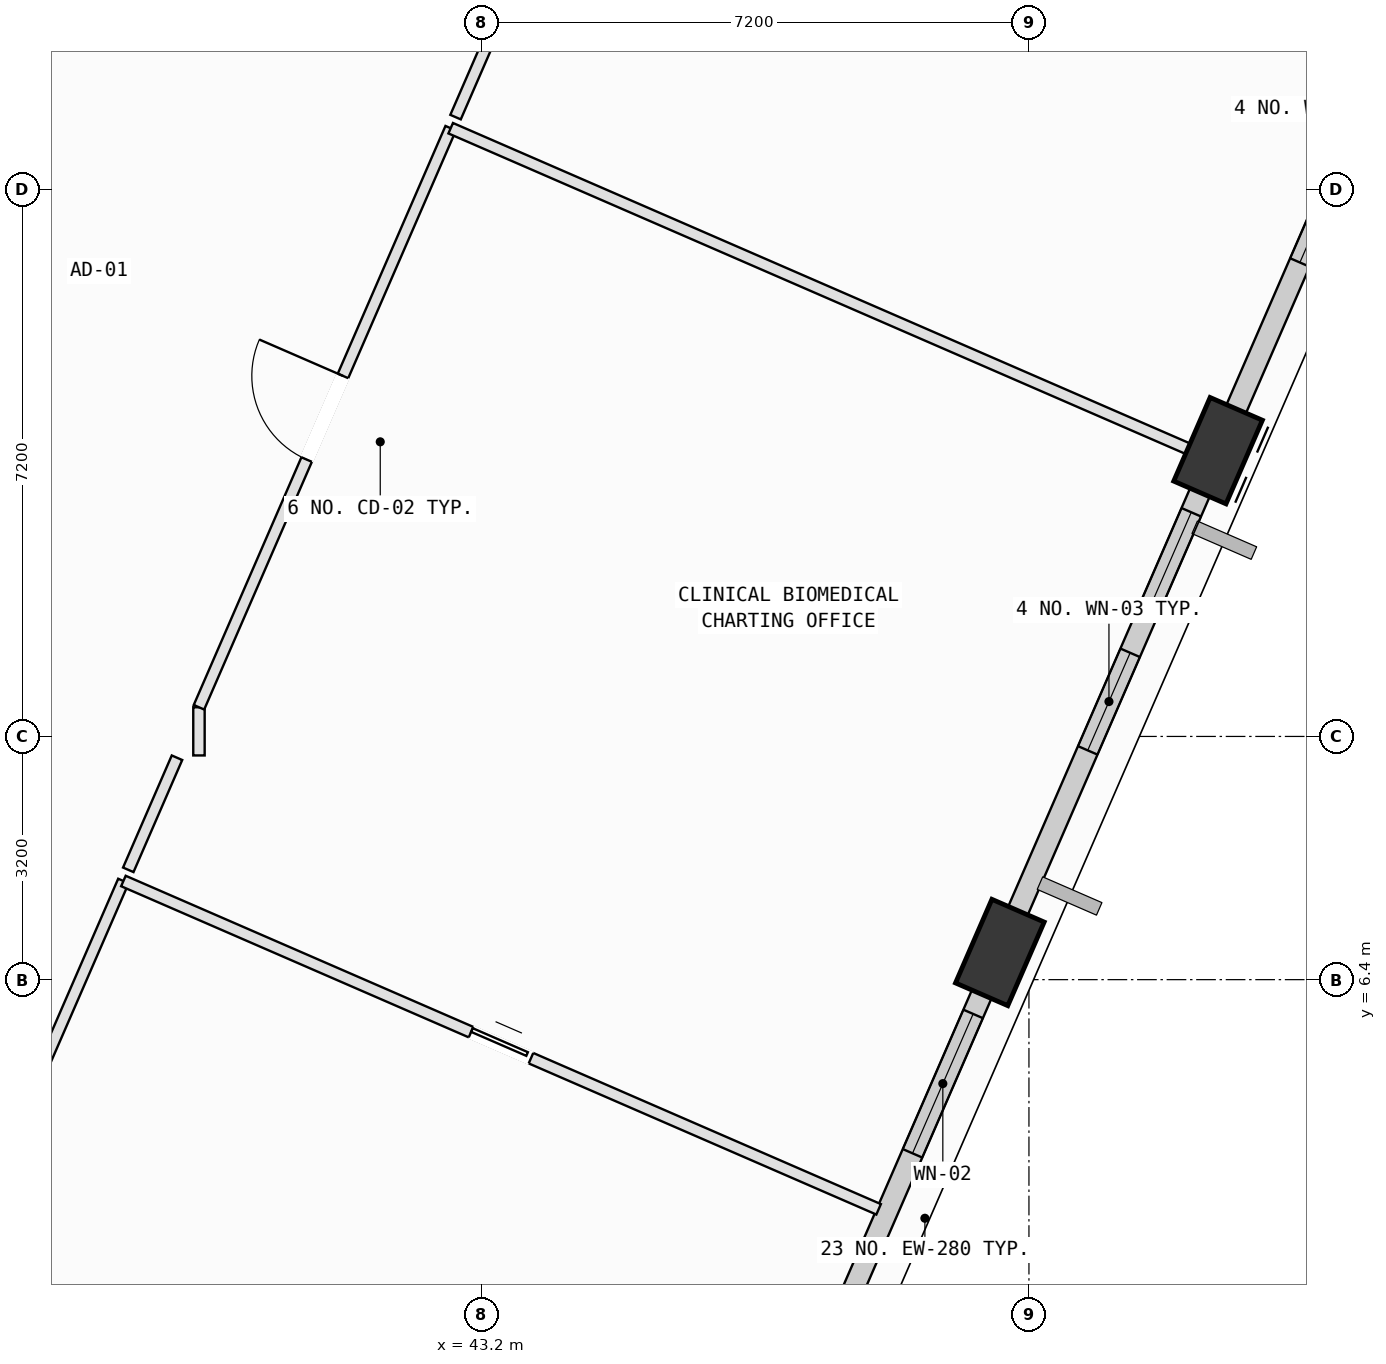
"""IFC4 building model, lengths in metres.
Left out: names, types, materials, properties, quantities, classifications, styles, units other than length and angle.
Written with IfcOpenShell. Run it as: python <this file> out.ifc"""

import sys

from ifc_helpers import new_model, si_unit, direction, frame, frame_2d, origin, origin_2d, place, context, subcontext, project, spatial, rectangle, extrude, element, fill, save


model = new_model("IFC4")
c1 = context("Model", 3, precision=1e-05, world=origin(), true_north=direction((0.0, 1.0)))
c2 = subcontext(c1, "Body", "Model", "MODEL_VIEW")
j1 = project(units=[si_unit("LENGTHUNIT", "METRE"), si_unit("PLANEANGLEUNIT", "RADIAN")], contexts=[c1])
p1 = place(None, origin())
s1 = spatial("IfcSite", under=j1, at=p1, CompositionType="ELEMENT")
p2 = place(p1, origin())
s2 = spatial("IfcBuilding", under=s1, at=p2, CompositionType="ELEMENT")
p3 = place(p2, frame((0.0, 0.0, 308.6)))
s3 = spatial("IfcBuildingStorey", under=s2, at=p3, CompositionType="ELEMENT", Elevation=308.6)
for number, where, z_axis, x_axis in (
    (1, (50.017, 6.757, 0.002), (0.0, 0.0, 1.0), (0.399, 0.917, 0.0)),
    (2, (52.888, 13.36, 0.002), (0.0, 0.0, 1.0), (0.399, 0.917, 0.0)),
):
    element("IfcColumn", number, at=place(p3, frame(where, z_axis=z_axis, x_axis=x_axis)), inside=s3, PredefinedType="COLUMN", context=c2, shape_type="SweptSolid", body=[
        extrude(rectangle(XDim=1.2, YDim=0.75, at=origin_2d()), origin(), (0.0, 0.0, 1.0), 3.996),
    ])
p4 = place(p3, frame((49.859, 6.393, 0.0), z_axis=(0.0, 0.0, 1.0), x_axis=(-0.398758169539, -0.917056117272, 0.0)))
e3 = element("IfcWall", 3, at=p4, inside=s3, PredefinedType="SOLIDWALL", context=c2, shape_type="SweptSolid", body=[
    extrude(rectangle(XDim=6.405, YDim=0.28, at=frame_2d((3.202, 0.0))), origin(), (0.0, 0.0, 1.0), 3.265),
])
p5 = place(p4, frame((0.484, 0.0, 0.75)))
e4 = element("IfcOpeningElement", 4, at=p5, cuts=e3, PredefinedType="OPENING", context=c2, shape_type="SweptSolid", body=[
    extrude(rectangle(XDim=2.0, YDim=1.95, at=frame_2d((1.0, 0.975))), frame((0.0, 0.15, 0.0), z_axis=(0.0, -1.0, 0.0), x_axis=(1.0, 0.0, 0.0)), (0.0, 0.0, 1.0), 0.3),
])
p6 = place(p3, frame((52.729, 12.996, 0.0), z_axis=(0.0, 0.0, 1.0), x_axis=(-0.398744230651, -0.917062178112, 0.0)))
e5 = element("IfcWall", 5, at=p6, inside=s3, PredefinedType="SOLIDWALL", context=c2, shape_type="SweptSolid", body=[
    extrude(rectangle(XDim=6.405, YDim=0.28, at=frame_2d((3.203, 0.0))), origin(), (0.0, 0.0, 1.0), 3.265),
])
p7 = place(p6, frame((2.502, 0.0, 0.75)))
e6 = element("IfcOpeningElement", 6, at=p7, cuts=e5, PredefinedType="OPENING", context=c2, shape_type="SweptSolid", body=[
    extrude(rectangle(XDim=1.4, YDim=1.85, at=frame_2d((0.7, 0.925))), frame((0.0, 0.15, 0.0), z_axis=(0.0, -1.0, 0.0), x_axis=(1.0, 0.0, 0.0)), (0.0, 0.0, 1.0), 0.3),
])
p8 = place(p6, frame((0.486, 0.0, 0.75)))
e7 = element("IfcOpeningElement", 7, at=p8, cuts=e5, PredefinedType="OPENING", context=c2, shape_type="SweptSolid", body=[
    extrude(rectangle(XDim=1.4, YDim=1.85, at=frame_2d((0.7, 0.925))), frame((0.0, 0.15, 0.0), z_axis=(0.0, -1.0, 0.0), x_axis=(1.0, 0.0, 0.0)), (0.0, 0.0, 1.0), 0.3),
])
p9 = place(p3, frame((55.601, 19.598, 0.0), z_axis=(0.0, 0.0, 1.0), x_axis=(-0.398744230651, -0.917062178112, 0.0)))
e8 = element("IfcWall", 8, at=p9, inside=s3, PredefinedType="SOLIDWALL", context=c2, shape_type="SweptSolid", body=[
    extrude(rectangle(XDim=6.405, YDim=0.28, at=frame_2d((3.203, 0.0))), origin(), (0.0, 0.0, 1.0), 3.265),
])
p10 = place(p9, frame((2.302, 0.0, 0.75)))
e9 = element("IfcOpeningElement", 9, at=p10, cuts=e8, PredefinedType="OPENING", context=c2, shape_type="SweptSolid", body=[
    extrude(rectangle(XDim=1.8, YDim=2.05, at=frame_2d((0.9, 1.025))), frame((0.0, 0.15, 0.0), z_axis=(0.0, -1.0, 0.0), x_axis=(1.0, 0.0, 0.0)), (0.0, 0.0, 1.0), 0.3),
])
p11 = place(p3, frame((33.286, -4.26, 0.0), z_axis=(0.0, 0.0, 1.0), x_axis=(0.398794571869, 0.9170402878, 0.0)))
e10 = element("IfcWall", 10, at=p11, inside=s3, PredefinedType="PARTITIONING", context=c2, shape_type="SweptSolid", body=[
    extrude(rectangle(XDim=13.04, YDim=0.15, at=frame_2d((6.52, 0.0))), origin(), (0.0, 0.0, 1.0), 2.765),
])
p12 = place(p3, frame((38.486, 7.698, 0.0), z_axis=(0.0, 0.0, 1.0), x_axis=(0.917068265028, -0.398730231207, 0.0)))
e11 = element("IfcWall", 11, at=p12, inside=s3, PredefinedType="PARTITIONING", context=c2, shape_type="SweptSolid", body=[
    extrude(rectangle(XDim=10.834, YDim=0.15, at=frame_2d((5.417, 0.0))), origin(), (0.0, 0.0, 1.0), 2.765),
])
p13 = place(p12, frame((4.987, 0.0, 0.0)))
e12 = element("IfcOpeningElement", 12, at=p13, cuts=e11, PredefinedType="OPENING", context=c2, shape_type="SweptSolid", body=[
    extrude(rectangle(XDim=0.86, YDim=2.06, at=frame_2d((0.43, 1.03))), frame((0.0, 0.085, 0.0), z_axis=(0.0, -1.0, 0.0), x_axis=(1.0, 0.0, 0.0)), (0.0, 0.0, 1.0), 0.17),
])
p14 = place(p3, frame((39.48, 9.35, 0.0), z_axis=(0.0, 0.0, 1.0), x_axis=(0.0, 1.0, 0.0)))
e13 = element("IfcWall", 13, at=p14, inside=s3, PredefinedType="PARTITIONING", context=c2, shape_type="SweptSolid", body=[
    extrude(rectangle(XDim=0.634, YDim=0.15, at=frame_2d((0.317, 0.0))), origin(), (0.0, 0.0, 1.0), 3.78),
])
p15 = place(p3, frame((39.48, 9.984, 0.0), z_axis=(0.0, 0.0, 1.0), x_axis=(0.398659488131, 0.917099020021, 0.0)))
e14 = element("IfcWall", 14, at=p15, inside=s3, PredefinedType="PARTITIONING", context=c2, shape_type="SweptSolid", body=[
    extrude(rectangle(XDim=8.308, YDim=0.15, at=frame_2d((4.154, 0.0))), origin(), (0.0, 0.0, 1.0), 3.78),
])
p16 = place(p15, frame((3.554, 0.0, 0.0)))
e15 = element("IfcOpeningElement", 15, at=p16, cuts=e14, PredefinedType="OPENING", context=c2, shape_type="SweptSolid", body=[
    extrude(rectangle(XDim=1.2, YDim=2.15, at=frame_2d((0.6, 1.075))), frame((0.0, 0.085, 0.0), z_axis=(0.0, -1.0, 0.0), x_axis=(1.0, 0.0, 0.0)), (0.0, 0.0, 1.0), 0.17),
])
p17 = place(p3, frame((42.792, 17.603, 0.0), z_axis=(0.0, 0.0, 1.0), x_axis=(0.917063112739, -0.398742081117, 0.0)))
e16 = element("IfcWall", 16, at=p17, inside=s3, PredefinedType="PARTITIONING", context=c2, shape_type="SweptSolid", body=[
    extrude(rectangle(XDim=11.18, YDim=0.15, at=frame_2d((5.59, 0.0))), origin(), (0.0, 0.0, 1.0), 3.78),
])
p18 = place(p3, frame((50.386, 7.03, 0.0), z_axis=(0.0, 0.0, 1.0), x_axis=(-0.398658726612, -0.91709935105, 0.0)))
e17 = element("IfcWall", 17, at=p18, inside=s3, PredefinedType="PARTITIONING", context=c2, shape_type="SweptSolid", body=[
    extrude(rectangle(XDim=0.795, YDim=0.15, at=frame_2d((0.397, 0.0))), origin(), (0.0, 0.0, 1.0), 3.265),
])
p19 = place(p3, frame((38.55, 7.845, 0.0), z_axis=(0.0, 0.0, 1.0), x_axis=(0.398476313607, 0.917178623548, 0.0)))
e18 = element("IfcWall", 18, at=p19, inside=s3, PredefinedType="PARTITIONING", context=c2, shape_type="SweptSolid", body=[
    extrude(rectangle(XDim=1.608, YDim=0.15, at=frame_2d((0.804, 0.0))), origin(), (0.0, 0.0, 1.0), 3.78),
])
p20 = place(p3, frame((42.856, 17.749, 0.0), z_axis=(0.0, 0.0, 1.0), x_axis=(0.398751440491, 0.917059043195, 0.0)))
e19 = element("IfcWall", 19, at=p20, inside=s3, PredefinedType="PARTITIONING", context=c2, shape_type="SweptSolid", body=[
    extrude(rectangle(XDim=13.041, YDim=0.15, at=frame_2d((6.52, 0.0))), origin(), (0.0, 0.0, 1.0), 3.78),
])
p21 = place(p20, frame((5.92, 0.0, 0.0)))
e20 = element("IfcOpeningElement", 20, at=p21, cuts=e19, PredefinedType="OPENING", context=c2, shape_type="SweptSolid", body=[
    extrude(rectangle(XDim=1.2, YDim=2.15, at=frame_2d((0.6, 1.075))), frame((0.0, 0.085, 0.0), z_axis=(0.0, -1.0, 0.0), x_axis=(1.0, 0.0, 0.0)), (0.0, 0.0, 1.0), 0.17),
])
p22 = place(p5, origin())
e21 = element("IfcWindow", 21, at=p22, inside=s3, PartitioningType="SINGLE_PANEL", PredefinedType="WINDOW", context=c2, shape_type="SweptSolid", body=[
    extrude(rectangle(XDim=2.0, YDim=1.95, at=frame_2d((1.0, 0.975))), frame((0.0, 0.03, 0.0), z_axis=(0.0, -1.0, 0.0), x_axis=(1.0, 0.0, 0.0)), (0.0, 0.0, 1.0), 0.06),
])
fill(e4, e21)
p23 = place(p7, origin())
e22 = element("IfcWindow", 22, at=p23, inside=s3, PartitioningType="SINGLE_PANEL", PredefinedType="WINDOW", context=c2, shape_type="SweptSolid", body=[
    extrude(rectangle(XDim=1.4, YDim=1.85, at=frame_2d((0.7, 0.925))), frame((0.0, 0.03, 0.0), z_axis=(0.0, -1.0, 0.0), x_axis=(1.0, 0.0, 0.0)), (0.0, 0.0, 1.0), 0.06),
])
fill(e6, e22)
p24 = place(p8, origin())
e23 = element("IfcWindow", 23, at=p24, inside=s3, PartitioningType="SINGLE_PANEL", PredefinedType="WINDOW", context=c2, shape_type="SweptSolid", body=[
    extrude(rectangle(XDim=1.4, YDim=1.85, at=frame_2d((0.7, 0.925))), frame((0.0, 0.03, 0.0), z_axis=(0.0, -1.0, 0.0), x_axis=(1.0, 0.0, 0.0)), (0.0, 0.0, 1.0), 0.06),
])
fill(e7, e23)
p25 = place(p10, origin())
e24 = element("IfcWindow", 24, at=p25, inside=s3, PartitioningType="SINGLE_PANEL", PredefinedType="WINDOW", context=c2, shape_type="SweptSolid", body=[
    extrude(rectangle(XDim=1.8, YDim=2.05, at=frame_2d((0.9, 1.025))), frame((0.0, 0.03, 0.0), z_axis=(0.0, -1.0, 0.0), x_axis=(1.0, 0.0, 0.0)), (0.0, 0.0, 1.0), 0.06),
])
fill(e9, e24)
p26 = place(p16, origin())
e25 = element("IfcDoor", 25, at=p26, inside=s3, OperationType="SINGLE_SWING_RIGHT", PredefinedType="DOOR", context=c2, shape_type="SweptSolid", body=[
    extrude(rectangle(XDim=1.2, YDim=2.15, at=frame_2d((0.6, 1.075))), frame((0.0, 0.025, 0.0), z_axis=(0.0, -1.0, 0.0), x_axis=(1.0, 0.0, 0.0)), (0.0, 0.0, 1.0), 0.05),
])
fill(e15, e25)
p27 = place(p13, origin())
e26 = element("IfcDoor", 26, at=p27, inside=s3, OperationType="SLIDING_TO_LEFT", PredefinedType="DOOR", context=c2, shape_type="SweptSolid", body=[
    extrude(rectangle(XDim=0.86, YDim=2.06, at=frame_2d((0.43, 1.03))), frame((0.0, 0.025, 0.0), z_axis=(0.0, -1.0, 0.0), x_axis=(1.0, 0.0, 0.0)), (0.0, 0.0, 1.0), 0.05),
])
fill(e12, e26)
save(model, sys.argv[1])
